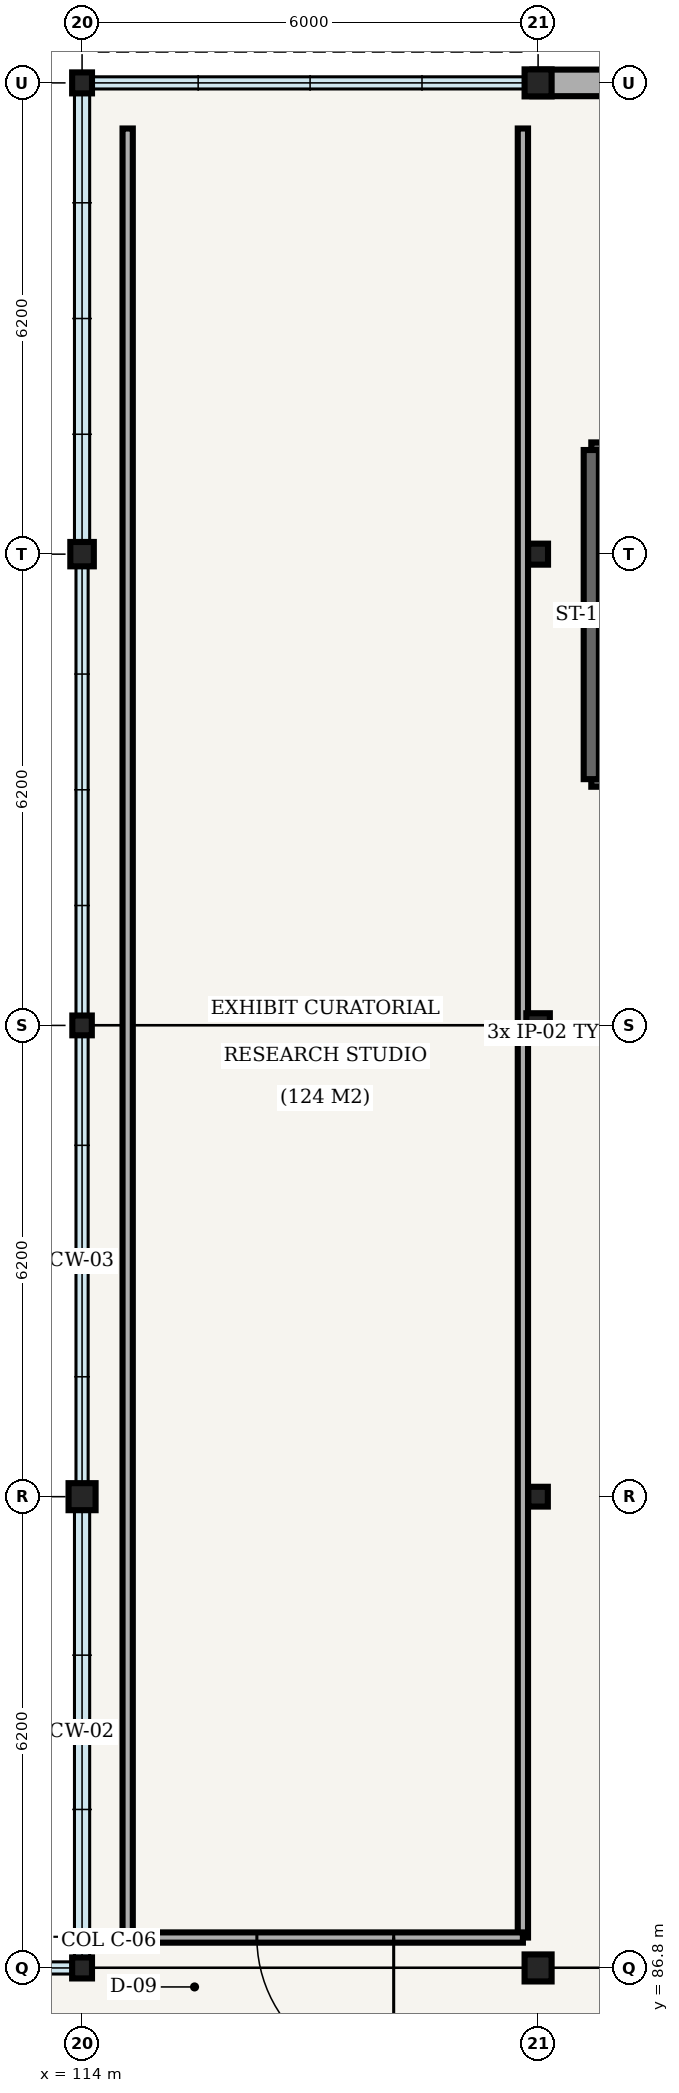
"""IFC4 building model, lengths in metres.
Left out: names, types, materials, properties, quantities, classifications, styles, units other than length and angle.
Written with IfcOpenShell. Run it as: python <this file> out.ifc"""

import sys

from ifc_helpers import new_model, si_unit, direction, frame, frame_2d, origin, origin_2d, place, context, subcontext, project, spatial, rectangle, hollow_circle, i_section, extrude, element, fill, save


model = new_model("IFC4")
c1 = context("Model", 3, precision=1e-05, world=origin(), true_north=direction((0.0, 1.0)))
c2 = subcontext(c1, "Body", "Model", "MODEL_VIEW")
j1 = project(units=[si_unit("LENGTHUNIT", "METRE"), si_unit("PLANEANGLEUNIT", "RADIAN")], contexts=[c1])
p1 = place(None, origin())
s1 = spatial("IfcSite", under=j1, at=p1, CompositionType="ELEMENT")
p2 = place(p1, origin())
s2 = spatial("IfcBuilding", under=s1, at=p2, CompositionType="ELEMENT")
p3 = place(p2, frame((0.0, 0.0, 10.8)))
s3 = spatial("IfcBuildingStorey", under=s2, at=p3, CompositionType="ELEMENT", Elevation=10.8)
p4 = place(p3, frame((114.0, 86.8, 0.0), z_axis=(0.0, 0.0, 1.0), x_axis=(1.0, 0.0, 0.0)))
e1 = element("IfcColumn", 1, at=p4, inside=s3, PredefinedType="COLUMN", context=c2, shape_type="SweptSolid", body=[
    extrude(i_section(OverallWidth=0.261, OverallDepth=0.276, WebThickness=0.015, FlangeThickness=0.025, FilletRadius=0.013, at=origin_2d()), origin(), (0.0, 0.0, 1.0), 4.8),
])
p5 = place(p3, frame((114.0, 93.0, 0.0), z_axis=(0.0, 0.0, 1.0), x_axis=(1.0, 0.0, 0.0)))
e2 = element("IfcColumn", 2, at=p5, inside=s3, PredefinedType="COLUMN", context=c2, shape_type="SweptSolid", body=[
    extrude(hollow_circle(Radius=0.178, WallThickness=0.012, at=origin_2d()), origin(), (0.0, 0.0, 1.0), 4.8),
])
p6 = place(p3, frame((114.0, 99.2, 0.0), z_axis=(0.0, 0.0, 1.0), x_axis=(1.0, 0.0, 0.0)))
e3 = element("IfcColumn", 3, at=p6, inside=s3, PredefinedType="COLUMN", context=c2, shape_type="SweptSolid", body=[
    extrude(i_section(OverallWidth=0.256, OverallDepth=0.26, WebThickness=0.01, FlangeThickness=0.017, FilletRadius=0.013, at=origin_2d()), origin(), (0.0, 0.0, 1.0), 4.8),
])
p7 = place(p3, frame((114.0, 105.4, 0.0), z_axis=(0.0, 0.0, 1.0), x_axis=(1.0, 0.0, 0.0)))
e4 = element("IfcColumn", 4, at=p7, inside=s3, PredefinedType="COLUMN", context=c2, shape_type="SweptSolid", body=[
    extrude(i_section(OverallWidth=0.309, OverallDepth=0.321, WebThickness=0.014, FlangeThickness=0.022, FilletRadius=0.015, at=origin_2d()), origin(), (0.0, 0.0, 1.0), 4.8),
])
p8 = place(p3, frame((114.0, 111.6, 0.0), z_axis=(0.0, 0.0, 1.0), x_axis=(1.0, 0.0, 0.0)))
e5 = element("IfcColumn", 5, at=p8, inside=s3, PredefinedType="COLUMN", context=c2, shape_type="SweptSolid", body=[
    extrude(i_section(OverallWidth=0.261, OverallDepth=0.276, WebThickness=0.015, FlangeThickness=0.025, FilletRadius=0.013, at=origin_2d()), origin(), (0.0, 0.0, 1.0), 4.8),
])
p9 = place(p3, frame((120.0, 86.8, 0.0), z_axis=(0.0, 0.0, 1.0), x_axis=(1.0, 0.0, 0.0)))
e6 = element("IfcColumn", 6, at=p9, inside=s3, PredefinedType="COLUMN", context=c2, shape_type="SweptSolid", body=[
    extrude(hollow_circle(Radius=0.178, WallThickness=0.012, at=origin_2d()), origin(), (0.0, 0.0, 1.0), 4.8),
])
p10 = place(p3, frame((120.0, 93.0, 0.0), z_axis=(0.0, 0.0, 1.0), x_axis=(1.0, 0.0, 0.0)))
e7 = element("IfcColumn", 7, at=p10, inside=s3, PredefinedType="COLUMN", context=c2, shape_type="SweptSolid", body=[
    extrude(i_section(OverallWidth=0.256, OverallDepth=0.26, WebThickness=0.01, FlangeThickness=0.017, FilletRadius=0.013, at=origin_2d()), origin(), (0.0, 0.0, 1.0), 4.8),
])
p11 = place(p3, frame((120.0, 99.2, 0.0), z_axis=(0.0, 0.0, 1.0), x_axis=(1.0, 0.0, 0.0)))
e8 = element("IfcColumn", 8, at=p11, inside=s3, PredefinedType="COLUMN", context=c2, shape_type="SweptSolid", body=[
    extrude(i_section(OverallWidth=0.309, OverallDepth=0.321, WebThickness=0.014, FlangeThickness=0.022, FilletRadius=0.015, at=origin_2d()), origin(), (0.0, 0.0, 1.0), 4.8),
])
p12 = place(p3, frame((120.0, 105.4, 0.0), z_axis=(0.0, 0.0, 1.0), x_axis=(1.0, 0.0, 0.0)))
e9 = element("IfcColumn", 9, at=p12, inside=s3, PredefinedType="COLUMN", context=c2, shape_type="SweptSolid", body=[
    extrude(i_section(OverallWidth=0.261, OverallDepth=0.276, WebThickness=0.015, FlangeThickness=0.025, FilletRadius=0.013, at=origin_2d()), origin(), (0.0, 0.0, 1.0), 4.8),
])
p13 = place(p3, frame((120.0, 111.6, 0.0), z_axis=(0.0, 0.0, 1.0), x_axis=(1.0, 0.0, 0.0)))
e10 = element("IfcColumn", 10, at=p13, inside=s3, PredefinedType="COLUMN", context=c2, shape_type="SweptSolid", body=[
    extrude(hollow_circle(Radius=0.178, WallThickness=0.012, at=origin_2d()), origin(), (0.0, 0.0, 1.0), 4.8),
])
p14 = place(p3, frame((126.075, 111.6, 0.0), z_axis=(0.0, 0.0, 1.0), x_axis=(-1.0, 0.0, 0.0)))
e11 = element("IfcWall", 11, at=p14, inside=s3, PredefinedType="SOLIDWALL", context=c2, shape_type="SweptSolid", body=[
    extrude(rectangle(XDim=6.15, YDim=0.35, at=frame_2d((3.075, 0.0))), origin(), (0.0, 0.0, 1.0), 3.84),
])
p15 = place(p3, frame((120.7, 102.44, 0.0), z_axis=(0.0, 0.0, 1.0), x_axis=(1.0, 0.0, 0.0)))
e12 = element("IfcWall", 12, at=p15, inside=s3, PredefinedType="SHEAR", context=c2, shape_type="SweptSolid", body=[
    extrude(rectangle(XDim=3.34, YDim=0.2, at=frame_2d((1.67, 0.0))), origin(), (0.0, 0.0, 1.0), 4.55),
])
p16 = place(p15, frame((0.895, 0.0, 0.0)))
e13 = element("IfcOpeningElement", 13, at=p16, cuts=e12, PredefinedType="OPENING", context=c2, shape_type="SweptSolid", body=[
    extrude(rectangle(XDim=1.55, YDim=2.2, at=frame_2d((0.775, 1.1))), frame((0.0, 0.11, 0.0), z_axis=(0.0, -1.0, 0.0), x_axis=(1.0, 0.0, 0.0)), (0.0, 0.0, 1.0), 0.22),
])
p17 = place(p3, frame((124.04, 106.77, 0.0), z_axis=(0.0, 0.0, 1.0), x_axis=(-1.0, 0.0, 0.0)))
e14 = element("IfcWall", 14, at=p17, inside=s3, PredefinedType="SHEAR", context=c2, shape_type="SweptSolid", body=[
    extrude(rectangle(XDim=3.34, YDim=0.2, at=frame_2d((1.67, 0.0))), origin(), (0.0, 0.0, 1.0), 4.55),
])
p18 = place(p3, frame((120.7, 106.77, 0.0), z_axis=(0.0, 0.0, 1.0), x_axis=(0.0, -1.0, 0.0)))
e15 = element("IfcWall", 15, at=p18, inside=s3, PredefinedType="SHEAR", context=c2, shape_type="SweptSolid", body=[
    extrude(rectangle(XDim=4.33, YDim=0.2, at=frame_2d((2.165, 0.0))), origin(), (0.0, 0.0, 1.0), 4.55),
])
p19 = place(p3, frame((119.8, 111.0, 0.0), z_axis=(0.0, 0.0, 1.0), x_axis=(0.0, -1.0, 0.0)))
e16 = element("IfcWall", 16, at=p19, inside=s3, PredefinedType="PARTITIONING", context=c2, shape_type="SweptSolid", body=[
    extrude(rectangle(XDim=23.8, YDim=0.135, at=frame_2d((11.9, 0.0))), origin(), (0.0, 0.0, 1.0), 3.52),
])
p20 = place(p3, frame((119.8, 87.2, 0.0), z_axis=(0.0, 0.0, 1.0), x_axis=(-1.0, 0.0, 0.0)))
e17 = element("IfcWall", 17, at=p20, inside=s3, PredefinedType="PARTITIONING", context=c2, shape_type="SweptSolid", body=[
    extrude(rectangle(XDim=5.2, YDim=0.135, at=frame_2d((2.6, 0.0))), origin(), (0.0, 0.0, 1.0), 3.52),
])
p21 = place(p20, frame((1.7, 0.0, 0.0)))
e18 = element("IfcOpeningElement", 18, at=p21, cuts=e17, PredefinedType="OPENING", context=c2, shape_type="SweptSolid", body=[
    extrude(rectangle(XDim=1.8, YDim=2.1, at=frame_2d((0.9, 1.05))), frame((0.0, 0.077, 0.0), z_axis=(0.0, -1.0, 0.0), x_axis=(1.0, 0.0, 0.0)), (0.0, 0.0, 1.0), 0.155),
])
p22 = place(p3, frame((114.6, 87.2, 0.0), z_axis=(0.0, 0.0, 1.0), x_axis=(0.0, 1.0, 0.0)))
e19 = element("IfcWall", 19, at=p22, inside=s3, PredefinedType="PARTITIONING", context=c2, shape_type="SweptSolid", body=[
    extrude(rectangle(XDim=23.8, YDim=0.135, at=frame_2d((11.9, 0.0))), origin(), (0.0, 0.0, 1.0), 3.52),
])
p23 = place(p21, origin())
e20 = element("IfcDoor", 20, at=p23, inside=s3, OperationType="DOUBLE_DOOR_SINGLE_SWING", PredefinedType="DOOR", context=c2, shape_type="SweptSolid", body=[
    extrude(rectangle(XDim=1.8, YDim=2.1, at=frame_2d((0.9, 1.05))), frame((0.0, 0.025, 0.0), z_axis=(0.0, -1.0, 0.0), x_axis=(1.0, 0.0, 0.0)), (0.0, 0.0, 1.0), 0.05),
])
fill(e18, e20)
save(model, sys.argv[1])
